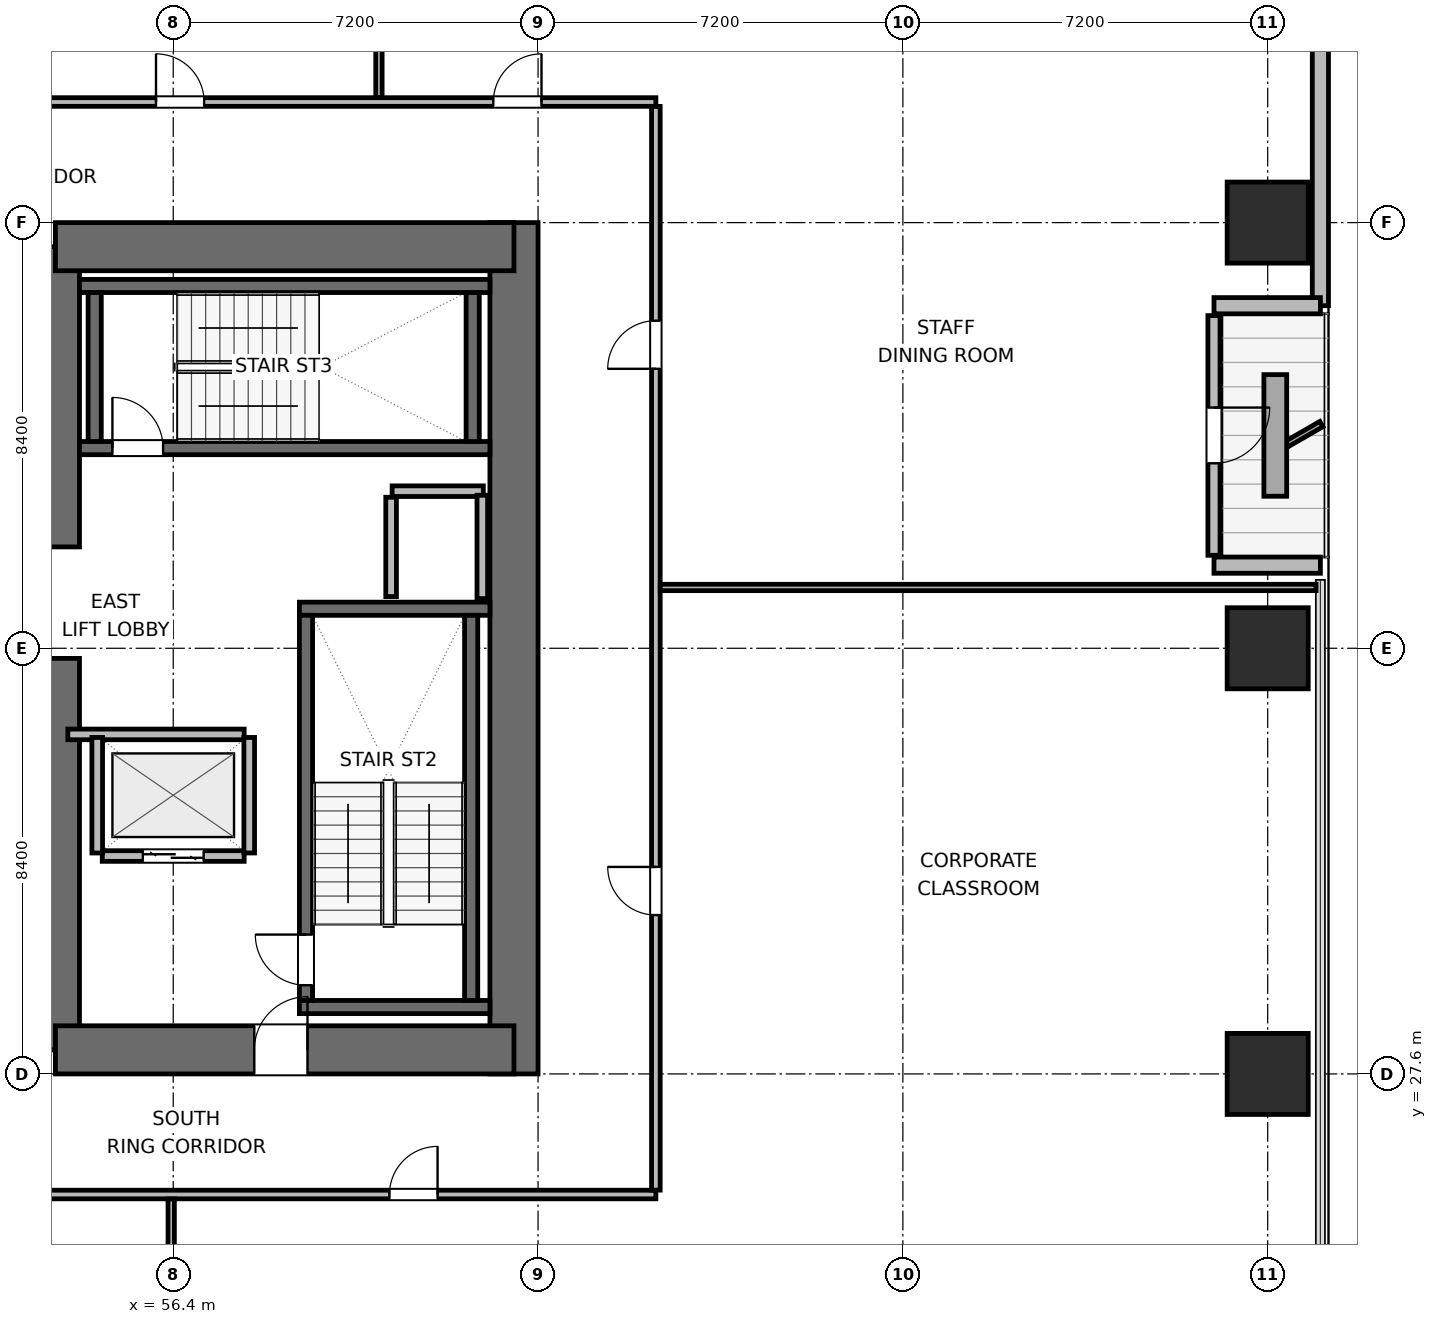
"""IFC4 building model, lengths in metres.
Left out: names, types, materials, properties, quantities, classifications, styles, units other than length and angle.
Written with IfcOpenShell. Run it as: python <this file> out.ifc"""

import sys

from ifc_helpers import new_model, si_unit, direction, frame, frame_2d, origin, origin_2d, place, context, subcontext, project, spatial, rectangle, extrude, element, fill, save


model = new_model("IFC4")
c1 = context("Model", 3, precision=1e-05, world=origin(), true_north=direction((0.0, 1.0)))
c2 = subcontext(c1, "Body", "Model", "MODEL_VIEW")
j1 = project(units=[si_unit("LENGTHUNIT", "METRE"), si_unit("PLANEANGLEUNIT", "RADIAN")], contexts=[c1])
p1 = place(None, origin())
s1 = spatial("IfcSite", under=j1, at=p1, CompositionType="ELEMENT")
p2 = place(p1, origin())
s2 = spatial("IfcBuilding", under=s1, at=p2, CompositionType="ELEMENT")
p3 = place(p2, frame((0.0, 0.0, 33.3)))
s3 = spatial("IfcBuildingStorey", under=s2, at=p3, CompositionType="ELEMENT", Elevation=33.3)
p4 = place(p3, frame((54.075, 28.075, 0.0), z_axis=(0.0, 0.0, 1.0), x_axis=(0.0, 1.0, 0.0)))
e1 = element("IfcWall", 1, at=p4, inside=s3, PredefinedType="SHEAR", context=c2, shape_type="SweptSolid", body=[
    extrude(rectangle(XDim=7.725, YDim=0.95, at=frame_2d((3.863, 0.0))), origin(), (0.0, 0.0, 1.0), 3.9),
])
p5 = place(p3, frame((54.075, 38.0, 0.0), z_axis=(0.0, 0.0, 1.0), x_axis=(0.0, 1.0, 0.0)))
e2 = element("IfcWall", 2, at=p5, inside=s3, PredefinedType="SHEAR", context=c2, shape_type="SweptSolid", body=[
    extrude(rectangle(XDim=5.925, YDim=0.95, at=frame_2d((2.962, 0.0))), origin(), (0.0, 0.0, 1.0), 3.9),
])
p6 = place(p3, frame((63.125, 27.6, 0.0), z_axis=(0.0, 0.0, 1.0), x_axis=(0.0, 1.0, 0.0)))
e3 = element("IfcWall", 3, at=p6, inside=s3, PredefinedType="SHEAR", context=c2, shape_type="SweptSolid", body=[
    extrude(rectangle(XDim=16.8, YDim=0.95, at=frame_2d((8.4, 0.0))), origin(), (0.0, 0.0, 1.0), 3.9),
])
p7 = place(p3, frame((54.075, 28.075, 0.0), z_axis=(0.0, 0.0, 1.0), x_axis=(1.0, 0.0, 0.0)))
e4 = element("IfcWall", 4, at=p7, inside=s3, PredefinedType="SHEAR", context=c2, shape_type="SweptSolid", body=[
    extrude(rectangle(XDim=9.05, YDim=0.95, at=frame_2d((4.525, 0.0))), origin(), (0.0, 0.0, 1.0), 3.9),
])
p8 = place(p7, frame((3.925, 0.0, 0.0)))
e5 = element("IfcOpeningElement", 5, at=p8, cuts=e4, PredefinedType="OPENING", context=c2, shape_type="SweptSolid", body=[
    extrude(rectangle(XDim=1.05, YDim=2.04, at=frame_2d((0.525, 1.02))), frame((0.0, 0.485, 0.0), z_axis=(0.0, -1.0, 0.0), x_axis=(1.0, 0.0, 0.0)), (0.0, 0.0, 1.0), 0.97),
])
p9 = place(p3, frame((54.075, 43.925, 0.0), z_axis=(0.0, 0.0, 1.0), x_axis=(1.0, 0.0, 0.0)))
e6 = element("IfcWall", 6, at=p9, inside=s3, PredefinedType="SHEAR", context=c2, shape_type="SweptSolid", body=[
    extrude(rectangle(XDim=9.05, YDim=0.95, at=frame_2d((4.525, 0.0))), origin(), (0.0, 0.0, 1.0), 3.9),
])
for number, where, z_axis, x_axis in (
    (7, (58.89, 28.92, 0.0), (0.0, 0.0, 1.0), (1.0, 0.0, 0.0)),
    (8, (58.89, 36.78, 0.0), (0.0, 0.0, 1.0), (1.0, 0.0, 0.0)),
):
    element("IfcWall", number, at=place(p3, frame(where, z_axis=z_axis, x_axis=x_axis)), inside=s3, PredefinedType="SHEAR", context=c2, shape_type="SweptSolid", body=[
        extrude(rectangle(XDim=3.76, YDim=0.26, at=frame_2d((1.88, 0.0))), origin(), (0.0, 0.0, 1.0), 3.9),
    ])
p10 = place(p3, frame((59.02, 29.05, 0.0), z_axis=(0.0, 0.0, 1.0), x_axis=(0.0, 1.0, 0.0)))
e9 = element("IfcWall", 9, at=p10, inside=s3, PredefinedType="SHEAR", context=c2, shape_type="SweptSolid", body=[
    extrude(rectangle(XDim=7.6, YDim=0.26, at=frame_2d((3.8, 0.0))), origin(), (0.0, 0.0, 1.0), 3.9),
])
p11 = place(p10, frame((0.3, 0.0, 0.0)))
e10 = element("IfcOpeningElement", 10, at=p11, cuts=e9, PredefinedType="OPENING", context=c2, shape_type="SweptSolid", body=[
    extrude(rectangle(XDim=1.0, YDim=2.04, at=frame_2d((0.5, 1.02))), frame((0.0, 0.14, 0.0), z_axis=(0.0, -1.0, 0.0), x_axis=(1.0, 0.0, 0.0)), (0.0, 0.0, 1.0), 0.28),
])
p12 = place(p3, frame((62.28, 29.05, 0.0), z_axis=(0.0, 0.0, 1.0), x_axis=(0.0, 1.0, 0.0)))
e11 = element("IfcWall", 11, at=p12, inside=s3, PredefinedType="SHEAR", context=c2, shape_type="SweptSolid", body=[
    extrude(rectangle(XDim=7.6, YDim=0.26, at=frame_2d((3.8, 0.0))), origin(), (0.0, 0.0, 1.0), 3.9),
])
p13 = place(p3, frame((54.55, 39.95, 0.0), z_axis=(0.0, 0.0, 1.0), x_axis=(1.0, 0.0, 0.0)))
e12 = element("IfcWall", 12, at=p13, inside=s3, PredefinedType="SHEAR", context=c2, shape_type="SweptSolid", body=[
    extrude(rectangle(XDim=8.1, YDim=0.26, at=frame_2d((4.05, 0.0))), origin(), (0.0, 0.0, 1.0), 3.9),
])
p14 = place(p13, frame((0.65, 0.0, 0.0)))
e13 = element("IfcOpeningElement", 13, at=p14, cuts=e12, PredefinedType="OPENING", context=c2, shape_type="SweptSolid", body=[
    extrude(rectangle(XDim=1.0, YDim=2.04, at=frame_2d((0.5, 1.02))), frame((0.0, 0.14, 0.0), z_axis=(0.0, -1.0, 0.0), x_axis=(1.0, 0.0, 0.0)), (0.0, 0.0, 1.0), 0.28),
])
p15 = place(p3, frame((54.55, 43.15, 0.0), z_axis=(0.0, 0.0, 1.0), x_axis=(1.0, 0.0, 0.0)))
e14 = element("IfcWall", 14, at=p15, inside=s3, PredefinedType="SHEAR", context=c2, shape_type="SweptSolid", body=[
    extrude(rectangle(XDim=8.1, YDim=0.26, at=frame_2d((4.05, 0.0))), origin(), (0.0, 0.0, 1.0), 3.9),
])
for number, where, z_axis, x_axis in (
    (15, (54.85, 40.08, 0.0), (0.0, 0.0, 1.0), (0.0, 1.0, 0.0)),
    (16, (62.31, 40.08, 0.0), (0.0, 0.0, 1.0), (0.0, 1.0, 0.0)),
):
    element("IfcWall", number, at=place(p3, frame(where, z_axis=z_axis, x_axis=x_axis)), inside=s3, PredefinedType="SHEAR", context=c2, shape_type="SweptSolid", body=[
        extrude(rectangle(XDim=2.94, YDim=0.26, at=frame_2d((1.47, 0.0))), origin(), (0.0, 0.0, 1.0), 3.9),
    ])
for number, where, z_axis, x_axis in (
    (17, (78.0, 27.6, 0.0), (0.0, 0.0, 1.0), (1.0, 0.0, 0.0)),
    (18, (78.0, 36.0, 0.0), (0.0, 0.0, 1.0), (1.0, 0.0, 0.0)),
    (19, (78.0, 44.4, 0.0), (0.0, 0.0, 1.0), (1.0, 0.0, 0.0)),
):
    element("IfcColumn", number, at=place(p3, frame(where, z_axis=z_axis, x_axis=x_axis)), inside=s3, PredefinedType="COLUMN", context=c2, shape_type="SweptSolid", body=[
        extrude(rectangle(XDim=1.6, YDim=1.6, at=origin_2d()), origin(), (0.0, 0.0, 1.0), 3.9),
    ])
p16 = place(p3, frame((79.04, 56.979, 0.0), z_axis=(0.0, 0.0, 1.0), x_axis=(0.0, -1.0, 0.0)))
e20 = element("IfcWall", 20, at=p16, inside=s3, PredefinedType="SOLIDWALL", context=c2, shape_type="SweptSolid", body=[
    extrude(rectangle(XDim=14.219, YDim=0.32, at=frame_2d((7.109, 0.0))), origin(), (0.0, 0.0, 1.0), 3.64),
])
p17 = place(p3, frame((79.04, 42.76, 0.0), z_axis=(0.0, 0.0, 1.0), x_axis=(-1.0, 0.0, 0.0)))
e21 = element("IfcWall", 21, at=p17, inside=s3, PredefinedType="SOLIDWALL", context=c2, shape_type="SweptSolid", body=[
    extrude(rectangle(XDim=2.1, YDim=0.32, at=frame_2d((1.05, 0.0))), origin(), (0.0, 0.0, 1.0), 2.875),
])
p18 = place(p3, frame((76.94, 42.565, 0.0), z_axis=(0.0, 0.0, 1.0), x_axis=(0.0, -1.0, 0.0)))
e22 = element("IfcWall", 22, at=p18, inside=s3, PredefinedType="SOLIDWALL", context=c2, shape_type="SweptSolid", body=[
    extrude(rectangle(XDim=4.73, YDim=0.24, at=frame_2d((2.365, 0.0))), origin(), (0.0, 0.0, 1.0), 3.162),
])
p19 = place(p18, frame((1.815, 0.0, 0.0)))
e23 = element("IfcOpeningElement", 23, at=p19, cuts=e22, PredefinedType="OPENING", context=c2, shape_type="SweptSolid", body=[
    extrude(rectangle(XDim=1.1, YDim=2.04, at=frame_2d((0.55, 1.02))), frame((0.0, 0.13, 0.0), z_axis=(0.0, -1.0, 0.0), x_axis=(1.0, 0.0, 0.0)), (0.0, 0.0, 1.0), 0.26),
])
p20 = place(p3, frame((76.94, 37.64, 0.0), z_axis=(0.0, 0.0, 1.0), x_axis=(1.0, 0.0, 0.0)))
e24 = element("IfcWall", 24, at=p20, inside=s3, PredefinedType="SOLIDWALL", context=c2, shape_type="SweptSolid", body=[
    extrude(rectangle(XDim=2.1, YDim=0.32, at=frame_2d((1.05, 0.0))), origin(), (0.0, 0.0, 1.0), 2.875),
])
p21 = place(p3, frame((60.72, 39.1, 0.0), z_axis=(0.0, 0.0, 1.0), x_axis=(1.0, 0.0, 0.0)))
e25 = element("IfcWall", 25, at=p21, inside=s3, PredefinedType="PARTITIONING", context=c2, shape_type="SweptSolid", body=[
    extrude(rectangle(XDim=1.8, YDim=0.21, at=frame_2d((0.9, 0.0))), origin(), (0.0, 0.0, 1.0), 3.64),
])
p22 = place(p3, frame((60.7, 37.02, 0.0), z_axis=(0.0, 0.0, 1.0), x_axis=(0.0, 1.0, 0.0)))
e26 = element("IfcWall", 26, at=p22, inside=s3, PredefinedType="PARTITIONING", context=c2, shape_type="SweptSolid", body=[
    extrude(rectangle(XDim=1.96, YDim=0.21, at=frame_2d((0.98, 0.0))), origin(), (0.0, 0.0, 1.0), 3.64),
])
p23 = place(p3, frame((62.5, 36.98, 0.0), z_axis=(0.0, 0.0, 1.0), x_axis=(0.0, 1.0, 0.0)))
e27 = element("IfcWall", 27, at=p23, inside=s3, PredefinedType="PARTITIONING", context=c2, shape_type="SweptSolid", body=[
    extrude(rectangle(XDim=2.04, YDim=0.21, at=frame_2d((1.02, 0.0))), origin(), (0.0, 0.0, 1.0), 3.64),
])
p24 = place(p3, frame((55.0, 31.9, 0.0), z_axis=(0.0, 0.0, 1.0), x_axis=(1.0, 0.0, 0.0)))
e28 = element("IfcWall", 28, at=p24, inside=s3, PredefinedType="PARTITIONING", context=c2, shape_type="SweptSolid", body=[
    extrude(rectangle(XDim=2.8, YDim=0.21, at=frame_2d((1.4, 0.0))), origin(), (0.0, 0.0, 1.0), 3.64),
])
p25 = place(p24, frame((0.8, 0.0, 0.0)))
e29 = element("IfcOpeningElement", 29, at=p25, cuts=e28, PredefinedType="OPENING", context=c2, shape_type="SweptSolid", body=[
    extrude(rectangle(XDim=1.2, YDim=2.04, at=frame_2d((0.6, 1.02))), frame((0.0, 0.115, 0.0), z_axis=(0.0, -1.0, 0.0), x_axis=(1.0, 0.0, 0.0)), (0.0, 0.0, 1.0), 0.23),
])
p26 = place(p3, frame((54.32, 34.3, 0.0), z_axis=(0.0, 0.0, 1.0), x_axis=(1.0, 0.0, 0.0)))
e30 = element("IfcWall", 30, at=p26, inside=s3, PredefinedType="PARTITIONING", context=c2, shape_type="SweptSolid", body=[
    extrude(rectangle(XDim=3.48, YDim=0.21, at=frame_2d((1.74, 0.0))), origin(), (0.0, 0.0, 1.0), 3.64),
])
for number, where, z_axis, x_axis in (
    (31, (54.9, 31.96, 0.0), (0.0, 0.0, 1.0), (0.0, 1.0, 0.0)),
    (32, (57.9, 31.96, 0.0), (0.0, 0.0, 1.0), (0.0, 1.0, 0.0)),
):
    element("IfcWall", number, at=place(p3, frame(where, z_axis=z_axis, x_axis=x_axis)), inside=s3, PredefinedType="PARTITIONING", context=c2, shape_type="SweptSolid", body=[
        extrude(rectangle(XDim=2.28, YDim=0.21, at=frame_2d((1.14, 0.0))), origin(), (0.0, 0.0, 1.0), 3.64),
    ])
p27 = place(p3, frame((30.075, 25.22, 0.0), z_axis=(0.0, 0.0, 1.0), x_axis=(1.0, 0.0, 0.0)))
e33 = element("IfcWall", 33, at=p27, inside=s3, PredefinedType="PARTITIONING", context=c2, shape_type="SweptSolid", body=[
    extrude(rectangle(XDim=35.85, YDim=0.17, at=frame_2d((17.925, 0.0))), origin(), (0.0, 0.0, 1.0), 3.64),
])
p28 = place(p27, frame((4.308, 0.0, 0.0)))
e34 = element("IfcOpeningElement", 34, at=p28, cuts=e33, PredefinedType="OPENING", context=c2, shape_type="SweptSolid", body=[
    extrude(rectangle(XDim=0.95, YDim=2.04, at=frame_2d((0.475, 1.02))), frame((0.0, 0.095, 0.0), z_axis=(0.0, -1.0, 0.0), x_axis=(1.0, 0.0, 0.0)), (0.0, 0.0, 1.0), 0.19),
])
p29 = place(p27, frame((13.27, 0.0, 0.0)))
e35 = element("IfcOpeningElement", 35, at=p29, cuts=e33, PredefinedType="OPENING", context=c2, shape_type="SweptSolid", body=[
    extrude(rectangle(XDim=0.95, YDim=2.04, at=frame_2d((0.475, 1.02))), frame((0.0, 0.095, 0.0), z_axis=(0.0, -1.0, 0.0), x_axis=(1.0, 0.0, 0.0)), (0.0, 0.0, 1.0), 0.19),
])
p30 = place(p27, frame((21.63, 0.0, 0.0)))
e36 = element("IfcOpeningElement", 36, at=p30, cuts=e33, PredefinedType="OPENING", context=c2, shape_type="SweptSolid", body=[
    extrude(rectangle(XDim=0.95, YDim=2.04, at=frame_2d((0.475, 1.02))), frame((0.0, 0.095, 0.0), z_axis=(0.0, -1.0, 0.0), x_axis=(1.0, 0.0, 0.0)), (0.0, 0.0, 1.0), 0.19),
])
p31 = place(p27, frame((30.592, 0.0, 0.0)))
e37 = element("IfcOpeningElement", 37, at=p31, cuts=e33, PredefinedType="OPENING", context=c2, shape_type="SweptSolid", body=[
    extrude(rectangle(XDim=0.95, YDim=2.04, at=frame_2d((0.475, 1.02))), frame((0.0, 0.095, 0.0), z_axis=(0.0, -1.0, 0.0), x_axis=(1.0, 0.0, 0.0)), (0.0, 0.0, 1.0), 0.19),
])
p32 = place(p3, frame((30.075, 46.78, 0.0), z_axis=(0.0, 0.0, 1.0), x_axis=(1.0, 0.0, 0.0)))
e38 = element("IfcWall", 38, at=p32, inside=s3, PredefinedType="PARTITIONING", context=c2, shape_type="SweptSolid", body=[
    extrude(rectangle(XDim=35.85, YDim=0.17, at=frame_2d((17.925, 0.0))), origin(), (0.0, 0.0, 1.0), 3.64),
])
p33 = place(p32, frame((4.053, 0.0, 0.0)))
e39 = element("IfcOpeningElement", 39, at=p33, cuts=e38, PredefinedType="OPENING", context=c2, shape_type="SweptSolid", body=[
    extrude(rectangle(XDim=0.95, YDim=2.04, at=frame_2d((0.475, 1.02))), frame((0.0, 0.095, 0.0), z_axis=(0.0, -1.0, 0.0), x_axis=(1.0, 0.0, 0.0)), (0.0, 0.0, 1.0), 0.19),
])
p34 = place(p32, frame((11.05, 0.0, 0.0)))
e40 = element("IfcOpeningElement", 40, at=p34, cuts=e38, PredefinedType="OPENING", context=c2, shape_type="SweptSolid", body=[
    extrude(rectangle(XDim=0.95, YDim=2.04, at=frame_2d((0.475, 1.02))), frame((0.0, 0.095, 0.0), z_axis=(0.0, -1.0, 0.0), x_axis=(1.0, 0.0, 0.0)), (0.0, 0.0, 1.0), 0.19),
])
p35 = place(p32, frame((16.55, 0.0, 0.0)))
e41 = element("IfcOpeningElement", 41, at=p35, cuts=e38, PredefinedType="OPENING", context=c2, shape_type="SweptSolid", body=[
    extrude(rectangle(XDim=0.95, YDim=2.04, at=frame_2d((0.475, 1.02))), frame((0.0, 0.095, 0.0), z_axis=(0.0, -1.0, 0.0), x_axis=(1.0, 0.0, 0.0)), (0.0, 0.0, 1.0), 0.19),
])
p36 = place(p32, frame((20.82, 0.0, 0.0)))
e42 = element("IfcOpeningElement", 42, at=p36, cuts=e38, PredefinedType="OPENING", context=c2, shape_type="SweptSolid", body=[
    extrude(rectangle(XDim=0.95, YDim=2.04, at=frame_2d((0.475, 1.02))), frame((0.0, 0.095, 0.0), z_axis=(0.0, -1.0, 0.0), x_axis=(1.0, 0.0, 0.0)), (0.0, 0.0, 1.0), 0.19),
])
p37 = place(p32, frame((25.985, 0.0, 0.0)))
e43 = element("IfcOpeningElement", 43, at=p37, cuts=e38, PredefinedType="OPENING", context=c2, shape_type="SweptSolid", body=[
    extrude(rectangle(XDim=0.95, YDim=2.04, at=frame_2d((0.475, 1.02))), frame((0.0, 0.095, 0.0), z_axis=(0.0, -1.0, 0.0), x_axis=(1.0, 0.0, 0.0)), (0.0, 0.0, 1.0), 0.19),
])
p38 = place(p32, frame((32.643, 0.0, 0.0)))
e44 = element("IfcOpeningElement", 44, at=p38, cuts=e38, PredefinedType="OPENING", context=c2, shape_type="SweptSolid", body=[
    extrude(rectangle(XDim=0.95, YDim=2.04, at=frame_2d((0.475, 1.02))), frame((0.0, 0.095, 0.0), z_axis=(0.0, -1.0, 0.0), x_axis=(1.0, 0.0, 0.0)), (0.0, 0.0, 1.0), 0.19),
])
p39 = place(p3, frame((65.925, 25.307, 0.0), z_axis=(0.0, 0.0, 1.0), x_axis=(0.0, 1.0, 0.0)))
e45 = element("IfcWall", 45, at=p39, inside=s3, PredefinedType="PARTITIONING", context=c2, shape_type="SweptSolid", body=[
    extrude(rectangle(XDim=21.386, YDim=0.17, at=frame_2d((10.693, 0.0))), origin(), (0.0, 0.0, 1.0), 3.64),
])
p40 = place(p39, frame((5.428, 0.0, 0.0)))
e46 = element("IfcOpeningElement", 46, at=p40, cuts=e45, PredefinedType="OPENING", context=c2, shape_type="SweptSolid", body=[
    extrude(rectangle(XDim=0.95, YDim=2.04, at=frame_2d((0.475, 1.02))), frame((0.0, 0.095, 0.0), z_axis=(0.0, -1.0, 0.0), x_axis=(1.0, 0.0, 0.0)), (0.0, 0.0, 1.0), 0.19),
])
p41 = place(p39, frame((16.208, 0.0, 0.0)))
e47 = element("IfcOpeningElement", 47, at=p41, cuts=e45, PredefinedType="OPENING", context=c2, shape_type="SweptSolid", body=[
    extrude(rectangle(XDim=0.95, YDim=2.04, at=frame_2d((0.475, 1.02))), frame((0.0, 0.095, 0.0), z_axis=(0.0, -1.0, 0.0), x_axis=(1.0, 0.0, 0.0)), (0.0, 0.0, 1.0), 0.19),
])
p42 = place(p3, frame((56.36, 9.915, 0.0), z_axis=(0.0, 0.0, 1.0), x_axis=(0.0, 1.0, 0.0)))
e48 = element("IfcWall", 48, at=p42, inside=s3, PredefinedType="PARTITIONING", context=c2, shape_type="SweptSolid", body=[
    extrude(rectangle(XDim=15.218, YDim=0.125, at=frame_2d((7.609, 0.0))), origin(), (0.0, 0.0, 1.0), 2.93),
])
p43 = place(p3, frame((60.46, 46.867, 0.0), z_axis=(0.0, 0.0, 1.0), x_axis=(0.0, 1.0, 0.0)))
e49 = element("IfcWall", 49, at=p43, inside=s3, PredefinedType="PARTITIONING", context=c2, shape_type="SweptSolid", body=[
    extrude(rectangle(XDim=15.218, YDim=0.125, at=frame_2d((7.609, 0.0))), origin(), (0.0, 0.0, 1.0), 3.64),
])
p44 = place(p3, frame((66.012, 37.2, 0.0), z_axis=(0.0, 0.0, 1.0), x_axis=(1.0, 0.0, 0.0)))
e50 = element("IfcWall", 50, at=p44, inside=s3, PredefinedType="PARTITIONING", context=c2, shape_type="SweptSolid", body=[
    extrude(rectangle(XDim=12.943, YDim=0.125, at=frame_2d((6.472, 0.0))), origin(), (0.0, 0.0, 1.0), 3.64),
])
p45 = place(p19, origin())
e51 = element("IfcDoor", 51, at=p45, inside=s3, OperationType="SINGLE_SWING_LEFT", PredefinedType="DOOR", context=c2, shape_type="SweptSolid", body=[
    extrude(rectangle(XDim=1.1, YDim=2.04, at=frame_2d((0.55, 1.02))), frame((0.0, 0.025, 0.0), z_axis=(0.0, -1.0, 0.0), x_axis=(1.0, 0.0, 0.0)), (0.0, 0.0, 1.0), 0.05),
])
fill(e23, e51)
p46 = place(p11, origin())
e52 = element("IfcDoor", 52, at=p46, inside=s3, OperationType="SINGLE_SWING_RIGHT", PredefinedType="DOOR", context=c2, shape_type="SweptSolid", body=[
    extrude(rectangle(XDim=1.0, YDim=2.04, at=frame_2d((0.5, 1.02))), frame((0.0, 0.025, 0.0), z_axis=(0.0, -1.0, 0.0), x_axis=(1.0, 0.0, 0.0)), (0.0, 0.0, 1.0), 0.05),
])
fill(e10, e52)
p47 = place(p14, origin())
e53 = element("IfcDoor", 53, at=p47, inside=s3, OperationType="SINGLE_SWING_LEFT", PredefinedType="DOOR", context=c2, shape_type="SweptSolid", body=[
    extrude(rectangle(XDim=1.0, YDim=2.04, at=frame_2d((0.5, 1.02))), frame((0.0, 0.025, 0.0), z_axis=(0.0, -1.0, 0.0), x_axis=(1.0, 0.0, 0.0)), (0.0, 0.0, 1.0), 0.05),
])
fill(e13, e53)
p48 = place(p25, origin())
e54 = element("IfcDoor", 54, at=p48, inside=s3, OperationType="DOUBLE_DOOR_SLIDING", PredefinedType="DOOR", context=c2, shape_type="SweptSolid", body=[
    extrude(rectangle(XDim=1.2, YDim=2.04, at=frame_2d((0.6, 1.02))), frame((0.0, 0.025, 0.0), z_axis=(0.0, -1.0, 0.0), x_axis=(1.0, 0.0, 0.0)), (0.0, 0.0, 1.0), 0.05),
])
fill(e29, e54)
p49 = place(p8, origin())
e55 = element("IfcDoor", 55, at=p49, inside=s3, OperationType="SINGLE_SWING_RIGHT", PredefinedType="DOOR", context=c2, shape_type="SweptSolid", body=[
    extrude(rectangle(XDim=1.05, YDim=2.04, at=frame_2d((0.525, 1.02))), frame((0.0, 0.025, 0.0), z_axis=(0.0, -1.0, 0.0), x_axis=(1.0, 0.0, 0.0)), (0.0, 0.0, 1.0), 0.05),
])
fill(e5, e55)
p50 = place(p31, origin())
e56 = element("IfcDoor", 56, at=p50, inside=s3, OperationType="SINGLE_SWING_RIGHT", PredefinedType="DOOR", context=c2, shape_type="SweptSolid", body=[
    extrude(rectangle(XDim=0.95, YDim=2.04, at=frame_2d((0.475, 1.02))), frame((0.0, 0.025, 0.0), z_axis=(0.0, -1.0, 0.0), x_axis=(1.0, 0.0, 0.0)), (0.0, 0.0, 1.0), 0.05),
])
fill(e37, e56)
p51 = place(p37, origin())
e57 = element("IfcDoor", 57, at=p51, inside=s3, OperationType="SINGLE_SWING_LEFT", PredefinedType="DOOR", context=c2, shape_type="SweptSolid", body=[
    extrude(rectangle(XDim=0.95, YDim=2.04, at=frame_2d((0.475, 1.02))), frame((0.0, 0.025, 0.0), z_axis=(0.0, -1.0, 0.0), x_axis=(1.0, 0.0, 0.0)), (0.0, 0.0, 1.0), 0.05),
])
fill(e43, e57)
p52 = place(p38, origin())
e58 = element("IfcDoor", 58, at=p52, inside=s3, OperationType="SINGLE_SWING_RIGHT", PredefinedType="DOOR", context=c2, shape_type="SweptSolid", body=[
    extrude(rectangle(XDim=0.95, YDim=2.04, at=frame_2d((0.475, 1.02))), frame((0.0, 0.025, 0.0), z_axis=(0.0, -1.0, 0.0), x_axis=(1.0, 0.0, 0.0)), (0.0, 0.0, 1.0), 0.05),
])
fill(e44, e58)
p53 = place(p40, origin())
e59 = element("IfcDoor", 59, at=p53, inside=s3, OperationType="SINGLE_SWING_RIGHT", PredefinedType="DOOR", context=c2, shape_type="SweptSolid", body=[
    extrude(rectangle(XDim=0.95, YDim=2.04, at=frame_2d((0.475, 1.02))), frame((0.0, 0.025, 0.0), z_axis=(0.0, -1.0, 0.0), x_axis=(1.0, 0.0, 0.0)), (0.0, 0.0, 1.0), 0.05),
])
fill(e46, e59)
p54 = place(p41, origin())
e60 = element("IfcDoor", 60, at=p54, inside=s3, OperationType="SINGLE_SWING_LEFT", PredefinedType="DOOR", context=c2, shape_type="SweptSolid", body=[
    extrude(rectangle(XDim=0.95, YDim=2.04, at=frame_2d((0.475, 1.02))), frame((0.0, 0.025, 0.0), z_axis=(0.0, -1.0, 0.0), x_axis=(1.0, 0.0, 0.0)), (0.0, 0.0, 1.0), 0.05),
])
fill(e47, e60)
save(model, sys.argv[1])
